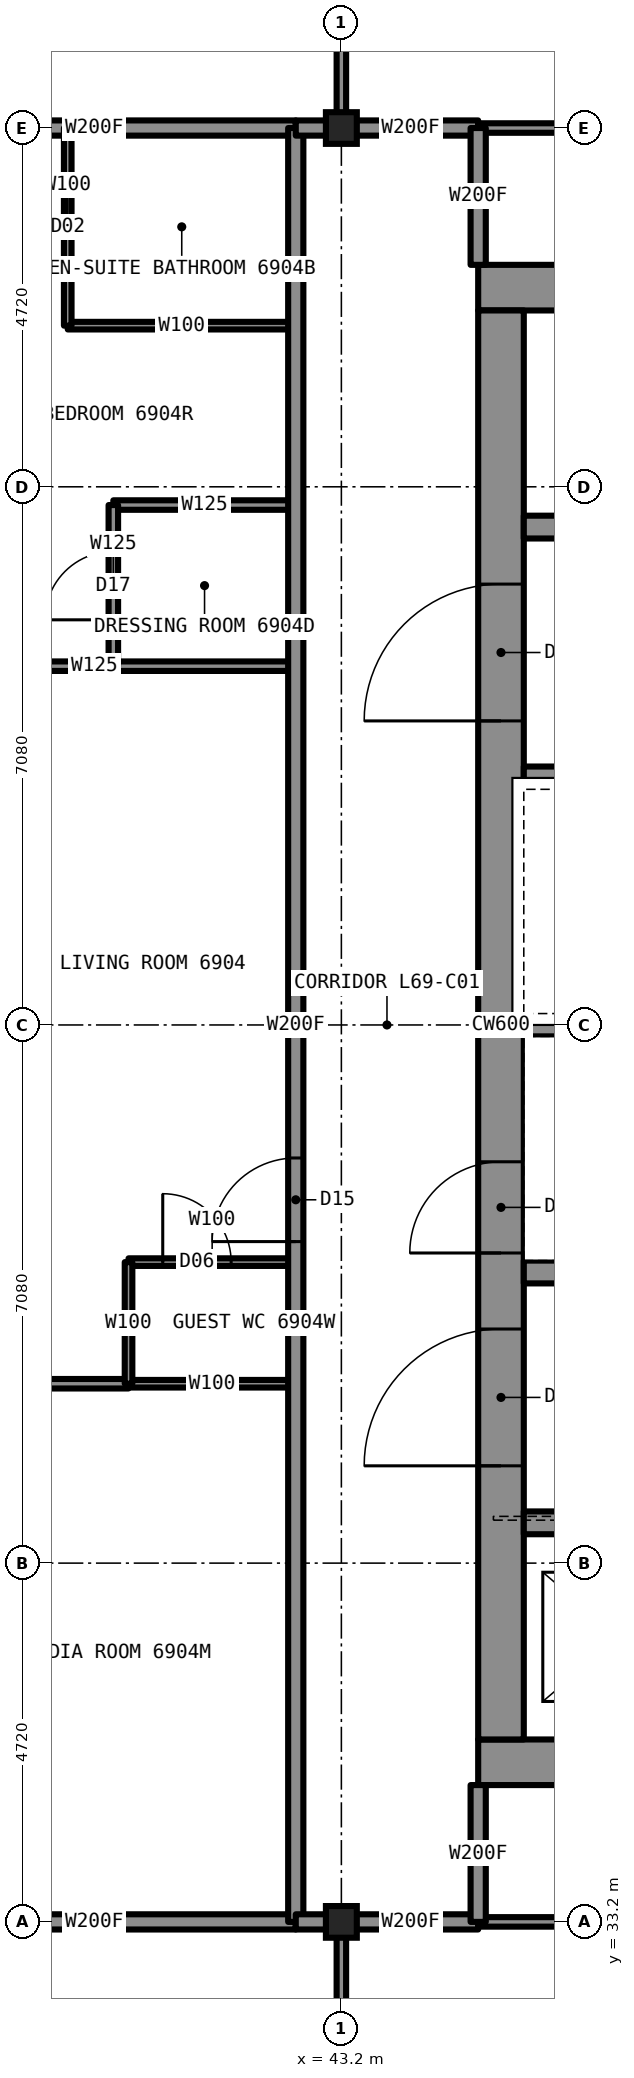
"""IFC4 building model, lengths in metres.
Left out: names, types, materials, properties, quantities, classifications, styles, units other than length and angle.
Written with IfcOpenShell. Run it as: python <this file> out.ifc"""

import sys

from ifc_helpers import new_model, si_unit, direction, frame, frame_2d, origin, origin_2d, place, context, subcontext, project, spatial, rectangle, i_section, extrude, element, fill, save


model = new_model("IFC4")
c1 = context("Model", 3, precision=1e-05, world=origin(), true_north=direction((0.0, 1.0)))
c2 = subcontext(c1, "Body", "Model", "MODEL_VIEW")
j1 = project(units=[si_unit("LENGTHUNIT", "METRE"), si_unit("PLANEANGLEUNIT", "RADIAN")], contexts=[c1])
p1 = place(None, origin())
s1 = spatial("IfcSite", under=j1, at=p1, CompositionType="ELEMENT")
p2 = place(p1, origin())
s2 = spatial("IfcBuilding", under=s1, at=p2, CompositionType="ELEMENT")
p3 = place(p2, frame((0.0, 0.0, 254.7)))
s3 = spatial("IfcBuildingStorey", under=s2, at=p3, CompositionType="ELEMENT", Elevation=254.7)
for number, where, z_axis, x_axis in (
    (1, (43.2, 33.2, 0.0), (0.0, 0.0, 1.0), (1.0, 0.0, 0.0)),
    (2, (43.2, 56.8, 0.0), (0.0, 0.0, 1.0), (1.0, 0.0, 0.0)),
):
    element("IfcColumn", number, at=place(p3, frame(where, z_axis=z_axis, x_axis=x_axis)), inside=s3, PredefinedType="COLUMN", context=c2, shape_type="SweptSolid", body=[
        extrude(i_section(OverallWidth=0.406, OverallDepth=0.417, WebThickness=0.03, FlangeThickness=0.048, at=origin_2d()), origin(), (0.0, 0.0, 1.0), 3.5),
    ])
for number, where, z_axis, x_axis in (
    (3, (45.0, 54.7, 0.0), (0.0, 0.0, 1.0), (1.0, 0.0, 0.0)),
    (4, (45.0, 35.3, 0.0), (0.0, 0.0, 1.0), (1.0, 0.0, 0.0)),
):
    element("IfcWall", number, at=place(p3, frame(where, z_axis=z_axis, x_axis=x_axis)), inside=s3, PredefinedType="SHEAR", context=c2, shape_type="SweptSolid", body=[
        extrude(rectangle(XDim=20.0, YDim=0.6, at=frame_2d((10.0, 0.0))), origin(), (0.0, 0.0, 1.0), 3.5),
    ])
p4 = place(p3, frame((45.3, 35.6, 0.0), z_axis=(0.0, 0.0, 1.0), x_axis=(0.0, 1.0, 0.0)))
e5 = element("IfcWall", 5, at=p4, inside=s3, PredefinedType="SHEAR", context=c2, shape_type="SweptSolid", body=[
    extrude(rectangle(XDim=18.8, YDim=0.6, at=frame_2d((9.4, 0.0))), origin(), (0.0, 0.0, 1.0), 3.5),
])
p5 = place(p4, frame((13.4, 0.0, 0.0)))
e6 = element("IfcOpeningElement", 6, at=p5, cuts=e5, PredefinedType="OPENING", context=c2, shape_type="SweptSolid", body=[
    extrude(rectangle(XDim=1.8, YDim=2.2, at=frame_2d((0.9, 1.1))), frame((0.0, 0.31, 0.0), z_axis=(0.0, -1.0, 0.0), x_axis=(1.0, 0.0, 0.0)), (0.0, 0.0, 1.0), 0.62),
])
p6 = place(p4, frame((3.6, 0.0, 0.0)))
e7 = element("IfcOpeningElement", 7, at=p6, cuts=e5, PredefinedType="OPENING", context=c2, shape_type="SweptSolid", body=[
    extrude(rectangle(XDim=1.8, YDim=2.2, at=frame_2d((0.9, 1.1))), frame((0.0, 0.31, 0.0), z_axis=(0.0, -1.0, 0.0), x_axis=(1.0, 0.0, 0.0)), (0.0, 0.0, 1.0), 0.62),
])
p7 = place(p4, frame((6.4, 0.0, 0.0)))
e8 = element("IfcOpeningElement", 8, at=p7, cuts=e5, PredefinedType="OPENING", context=c2, shape_type="SweptSolid", body=[
    extrude(rectangle(XDim=1.2, YDim=2.2, at=frame_2d((0.6, 1.1))), frame((0.0, 0.31, 0.0), z_axis=(0.0, -1.0, 0.0), x_axis=(1.0, 0.0, 0.0)), (0.0, 0.0, 1.0), 0.62),
])
p8 = place(p3, frame((45.6, 51.55, 0.0), z_axis=(0.0, 0.0, 1.0), x_axis=(1.0, 0.0, 0.0)))
e9 = element("IfcWall", 9, at=p8, inside=s3, PredefinedType="SHEAR", context=c2, shape_type="SweptSolid", body=[
    extrude(rectangle(XDim=18.8, YDim=0.3, at=frame_2d((9.4, 0.0))), origin(), (0.0, 0.0, 1.0), 3.5),
])
p9 = place(p8, frame((4.8, 0.0, 0.0)))
e10 = element("IfcOpeningElement", 10, at=p9, cuts=e9, PredefinedType="OPENING", context=c2, shape_type="SweptSolid", body=[
    extrude(rectangle(XDim=1.0, YDim=2.1, at=frame_2d((0.5, 1.05))), frame((0.0, 0.16, 0.0), z_axis=(0.0, -1.0, 0.0), x_axis=(1.0, 0.0, 0.0)), (0.0, 0.0, 1.0), 0.32),
])
p10 = place(p8, frame((11.6, 0.0, 0.0)))
e11 = element("IfcOpeningElement", 11, at=p10, cuts=e9, PredefinedType="OPENING", context=c2, shape_type="SweptSolid", body=[
    extrude(rectangle(XDim=1.1, YDim=2.2, at=frame_2d((0.55, 1.1))), frame((0.0, 0.16, 0.0), z_axis=(0.0, -1.0, 0.0), x_axis=(1.0, 0.0, 0.0)), (0.0, 0.0, 1.0), 0.32),
])
p11 = place(p8, frame((14.3, 0.0, 0.0)))
e12 = element("IfcOpeningElement", 12, at=p11, cuts=e9, PredefinedType="OPENING", context=c2, shape_type="SweptSolid", body=[
    extrude(rectangle(XDim=1.1, YDim=2.2, at=frame_2d((0.55, 1.1))), frame((0.0, 0.16, 0.0), z_axis=(0.0, -1.0, 0.0), x_axis=(1.0, 0.0, 0.0)), (0.0, 0.0, 1.0), 0.32),
])
p12 = place(p3, frame((45.6, 38.45, 0.0), z_axis=(0.0, 0.0, 1.0), x_axis=(1.0, 0.0, 0.0)))
e13 = element("IfcWall", 13, at=p12, inside=s3, PredefinedType="SHEAR", context=c2, shape_type="SweptSolid", body=[
    extrude(rectangle(XDim=18.8, YDim=0.3, at=frame_2d((9.4, 0.0))), origin(), (0.0, 0.0, 1.0), 3.5),
])
p13 = place(p12, frame((0.7, 0.0, 0.0)))
e14 = element("IfcOpeningElement", 14, at=p13, cuts=e13, PredefinedType="OPENING", context=c2, shape_type="SweptSolid", body=[
    extrude(rectangle(XDim=1.1, YDim=2.2, at=frame_2d((0.55, 1.1))), frame((0.0, 0.16, 0.0), z_axis=(0.0, -1.0, 0.0), x_axis=(1.0, 0.0, 0.0)), (0.0, 0.0, 1.0), 0.32),
])
p14 = place(p12, frame((3.4, 0.0, 0.0)))
e15 = element("IfcOpeningElement", 15, at=p14, cuts=e13, PredefinedType="OPENING", context=c2, shape_type="SweptSolid", body=[
    extrude(rectangle(XDim=1.1, YDim=2.2, at=frame_2d((0.55, 1.1))), frame((0.0, 0.16, 0.0), z_axis=(0.0, -1.0, 0.0), x_axis=(1.0, 0.0, 0.0)), (0.0, 0.0, 1.0), 0.32),
])
p15 = place(p12, frame((6.1, 0.0, 0.0)))
e16 = element("IfcOpeningElement", 16, at=p15, cuts=e13, PredefinedType="OPENING", context=c2, shape_type="SweptSolid", body=[
    extrude(rectangle(XDim=1.1, YDim=2.2, at=frame_2d((0.55, 1.1))), frame((0.0, 0.16, 0.0), z_axis=(0.0, -1.0, 0.0), x_axis=(1.0, 0.0, 0.0)), (0.0, 0.0, 1.0), 0.32),
])
p16 = place(p12, frame((8.8, 0.0, 0.0)))
e17 = element("IfcOpeningElement", 17, at=p16, cuts=e13, PredefinedType="OPENING", context=c2, shape_type="SweptSolid", body=[
    extrude(rectangle(XDim=1.1, YDim=2.2, at=frame_2d((0.55, 1.1))), frame((0.0, 0.16, 0.0), z_axis=(0.0, -1.0, 0.0), x_axis=(1.0, 0.0, 0.0)), (0.0, 0.0, 1.0), 0.32),
])
for number, where, z_axis, x_axis in (
    (18, (45.6, 48.25, 0.0), (0.0, 0.0, 1.0), (1.0, 0.0, 0.0)),
    (19, (45.6, 41.75, 0.0), (0.0, 0.0, 1.0), (1.0, 0.0, 0.0)),
):
    element("IfcWall", number, at=place(p3, frame(where, z_axis=z_axis, x_axis=x_axis)), inside=s3, PredefinedType="SHEAR", context=c2, shape_type="SweptSolid", body=[
        extrude(rectangle(XDim=7.1, YDim=0.3, at=frame_2d((3.55, 0.0))), origin(), (0.0, 0.0, 1.0), 3.5),
    ])
p17 = place(p3, frame((45.6, 45.0, 0.0), z_axis=(0.0, 0.0, 1.0), x_axis=(1.0, 0.0, 0.0)))
e20 = element("IfcWall", 20, at=p17, inside=s3, PredefinedType="SHEAR", context=c2, shape_type="SweptSolid", body=[
    extrude(rectangle(XDim=6.8, YDim=0.3, at=frame_2d((3.4, 0.0))), origin(), (0.0, 0.0, 1.0), 3.5),
])
p18 = place(p3, frame((43.22, 33.2, 0.0), z_axis=(0.0, 0.0, 1.0), x_axis=(1.0, 0.0, 0.0)))
e21 = element("IfcWall", 21, at=p18, inside=s3, PredefinedType="PARTITIONING", context=c2, shape_type="SweptSolid", body=[
    extrude(rectangle(XDim=1.78, YDim=0.2, at=frame_2d((0.89, 0.0))), origin(), (0.0, 0.0, 1.0), 3.33),
])
p19 = place(p3, frame((37.3, 33.2, 0.0), z_axis=(0.0, 0.0, 1.0), x_axis=(1.0, 0.0, 0.0)))
e22 = element("IfcWall", 22, at=p19, inside=s3, PredefinedType="PARTITIONING", context=c2, shape_type="SweptSolid", body=[
    extrude(rectangle(XDim=5.3, YDim=0.2, at=frame_2d((2.65, 0.0))), origin(), (0.0, 0.0, 1.0), 2.573),
])
p20 = place(p3, frame((45.0, 33.2, 0.0), z_axis=(0.0, 0.0, 1.0), x_axis=(1.0, 0.0, 0.0)))
e23 = element("IfcWall", 23, at=p20, inside=s3, PredefinedType="PARTITIONING", context=c2, shape_type="SweptSolid", body=[
    extrude(rectangle(XDim=2.92, YDim=0.125, at=frame_2d((1.46, 0.0))), origin(), (0.0, 0.0, 1.0), 3.33),
])
p21 = place(p3, frame((40.4, 41.88, 0.0), z_axis=(0.0, 0.0, 1.0), x_axis=(1.0, 0.0, 0.0)))
e24 = element("IfcWall", 24, at=p21, inside=s3, PredefinedType="PARTITIONING", context=c2, shape_type="SweptSolid", body=[
    extrude(rectangle(XDim=2.2, YDim=0.1, at=frame_2d((1.1, 0.0))), origin(), (0.0, 0.0, 1.0), 3.33),
])
p22 = place(p21, frame((0.45, 0.0, 0.0)))
e25 = element("IfcOpeningElement", 25, at=p22, cuts=e24, PredefinedType="OPENING", context=c2, shape_type="SweptSolid", body=[
    extrude(rectangle(XDim=0.9, YDim=2.1, at=frame_2d((0.45, 1.05))), frame((0.0, 0.06, 0.0), z_axis=(0.0, -1.0, 0.0), x_axis=(1.0, 0.0, 0.0)), (0.0, 0.0, 1.0), 0.12),
])
p23 = place(p3, frame((40.4, 40.28, 0.0), z_axis=(0.0, 0.0, 1.0), x_axis=(1.0, 0.0, 0.0)))
e26 = element("IfcWall", 26, at=p23, inside=s3, PredefinedType="PARTITIONING", context=c2, shape_type="SweptSolid", body=[
    extrude(rectangle(XDim=2.2, YDim=0.1, at=frame_2d((1.1, 0.0))), origin(), (0.0, 0.0, 1.0), 2.797),
])
p24 = place(p3, frame((37.3, 40.28, 0.0), z_axis=(0.0, 0.0, 1.0), x_axis=(1.0, 0.0, 0.0)))
e27 = element("IfcWall", 27, at=p24, inside=s3, PredefinedType="PARTITIONING", context=c2, shape_type="SweptSolid", body=[
    extrude(rectangle(XDim=3.1, YDim=0.125, at=frame_2d((1.55, 0.0))), origin(), (0.0, 0.0, 1.0), 2.797),
])
p25 = place(p24, frame((0.85, 0.0, 0.0)))
e28 = element("IfcOpeningElement", 28, at=p25, cuts=e27, PredefinedType="OPENING", context=c2, shape_type="SweptSolid", body=[
    extrude(rectangle(XDim=0.9, YDim=2.2, at=frame_2d((0.45, 1.1))), frame((0.0, 0.073, 0.0), z_axis=(0.0, -1.0, 0.0), x_axis=(1.0, 0.0, 0.0)), (0.0, 0.0, 1.0), 0.145),
])
p26 = place(p3, frame((43.22, 56.8, 0.0), z_axis=(0.0, 0.0, 1.0), x_axis=(1.0, 0.0, 0.0)))
e29 = element("IfcWall", 29, at=p26, inside=s3, PredefinedType="PARTITIONING", context=c2, shape_type="SweptSolid", body=[
    extrude(rectangle(XDim=1.78, YDim=0.2, at=frame_2d((0.89, 0.0))), origin(), (0.0, 0.0, 1.0), 3.33),
])
p27 = place(p3, frame((37.3, 56.8, 0.0), z_axis=(0.0, 0.0, 1.0), x_axis=(1.0, 0.0, 0.0)))
e30 = element("IfcWall", 30, at=p27, inside=s3, PredefinedType="PARTITIONING", context=c2, shape_type="SweptSolid", body=[
    extrude(rectangle(XDim=5.3, YDim=0.2, at=frame_2d((2.65, 0.0))), origin(), (0.0, 0.0, 1.0), 2.573),
])
p28 = place(p3, frame((45.0, 56.8, 0.0), z_axis=(0.0, 0.0, 1.0), x_axis=(1.0, 0.0, 0.0)))
e31 = element("IfcWall", 31, at=p28, inside=s3, PredefinedType="PARTITIONING", context=c2, shape_type="SweptSolid", body=[
    extrude(rectangle(XDim=2.92, YDim=0.125, at=frame_2d((1.46, 0.0))), origin(), (0.0, 0.0, 1.0), 3.33),
])
p29 = place(p3, frame((37.3, 49.72, 0.0), z_axis=(0.0, 0.0, 1.0), x_axis=(1.0, 0.0, 0.0)))
e32 = element("IfcWall", 32, at=p29, inside=s3, PredefinedType="PARTITIONING", context=c2, shape_type="SweptSolid", body=[
    extrude(rectangle(XDim=5.3, YDim=0.125, at=frame_2d((2.65, 0.0))), origin(), (0.0, 0.0, 1.0), 2.797),
])
p30 = place(p29, frame((0.85, 0.0, 0.0)))
e33 = element("IfcOpeningElement", 33, at=p30, cuts=e32, PredefinedType="OPENING", context=c2, shape_type="SweptSolid", body=[
    extrude(rectangle(XDim=0.9, YDim=2.2, at=frame_2d((0.45, 1.1))), frame((0.0, 0.073, 0.0), z_axis=(0.0, -1.0, 0.0), x_axis=(1.0, 0.0, 0.0)), (0.0, 0.0, 1.0), 0.145),
])
p31 = place(p3, frame((40.2, 51.84, 0.0), z_axis=(0.0, 0.0, 1.0), x_axis=(1.0, 0.0, 0.0)))
e34 = element("IfcWall", 34, at=p31, inside=s3, PredefinedType="PARTITIONING", context=c2, shape_type="SweptSolid", body=[
    extrude(rectangle(XDim=2.4, YDim=0.125, at=frame_2d((1.2, 0.0))), origin(), (0.0, 0.0, 1.0), 3.33),
])
p32 = place(p3, frame((39.6, 54.2, 0.0), z_axis=(0.0, 0.0, 1.0), x_axis=(1.0, 0.0, 0.0)))
e35 = element("IfcWall", 35, at=p32, inside=s3, PredefinedType="PARTITIONING", context=c2, shape_type="SweptSolid", body=[
    extrude(rectangle(XDim=3.0, YDim=0.1, at=frame_2d((1.5, 0.0))), origin(), (0.0, 0.0, 1.0), 3.33),
])
for number, where, z_axis, x_axis in (
    (36, (45.0, 33.2, 0.0), (0.0, 0.0, 1.0), (0.0, 1.0, 0.0)),
    (37, (45.0, 55.0, 0.0), (0.0, 0.0, 1.0), (0.0, 1.0, 0.0)),
):
    element("IfcWall", number, at=place(p3, frame(where, z_axis=z_axis, x_axis=x_axis)), inside=s3, PredefinedType="PARTITIONING", context=c2, shape_type="SweptSolid", body=[
        extrude(rectangle(XDim=1.8, YDim=0.2, at=frame_2d((0.9, 0.0))), origin(), (0.0, 0.0, 1.0), 3.33),
    ])
p33 = place(p3, frame((43.2, 27.3, 0.0), z_axis=(0.0, 0.0, 1.0), x_axis=(0.0, 1.0, 0.0)))
e38 = element("IfcWall", 38, at=p33, inside=s3, PredefinedType="PARTITIONING", context=c2, shape_type="SweptSolid", body=[
    extrude(rectangle(XDim=5.9, YDim=0.125, at=frame_2d((2.95, 0.0))), origin(), (0.0, 0.0, 1.0), 2.573),
])
p34 = place(p33, frame((1.45, 0.0, 0.0)))
e39 = element("IfcOpeningElement", 39, at=p34, cuts=e38, PredefinedType="OPENING", context=c2, shape_type="SweptSolid", body=[
    extrude(rectangle(XDim=0.9, YDim=2.2, at=frame_2d((0.45, 1.1))), frame((0.0, 0.073, 0.0), z_axis=(0.0, -1.0, 0.0), x_axis=(1.0, 0.0, 0.0)), (0.0, 0.0, 1.0), 0.145),
])
p35 = place(p3, frame((43.2, 56.8, 0.0), z_axis=(0.0, 0.0, 1.0), x_axis=(0.0, 1.0, 0.0)))
e40 = element("IfcWall", 40, at=p35, inside=s3, PredefinedType="PARTITIONING", context=c2, shape_type="SweptSolid", body=[
    extrude(rectangle(XDim=5.9, YDim=0.125, at=frame_2d((2.95, 0.0))), origin(), (0.0, 0.0, 1.0), 2.573),
])
p36 = place(p35, frame((3.55, 0.0, 0.0)))
e41 = element("IfcOpeningElement", 41, at=p36, cuts=e40, PredefinedType="OPENING", context=c2, shape_type="SweptSolid", body=[
    extrude(rectangle(XDim=0.9, YDim=2.2, at=frame_2d((0.45, 1.1))), frame((0.0, 0.073, 0.0), z_axis=(0.0, -1.0, 0.0), x_axis=(1.0, 0.0, 0.0)), (0.0, 0.0, 1.0), 0.145),
])
p37 = place(p3, frame((42.6, 33.2, 0.0), z_axis=(0.0, 0.0, 1.0), x_axis=(0.0, 1.0, 0.0)))
e42 = element("IfcWall", 42, at=p37, inside=s3, PredefinedType="PARTITIONING", context=c2, shape_type="SweptSolid", body=[
    extrude(rectangle(XDim=23.6, YDim=0.2, at=frame_2d((11.8, 0.0))), origin(), (0.0, 0.0, 1.0), 3.33),
])
p38 = place(p37, frame((8.95, 0.0, 0.0)))
e43 = element("IfcOpeningElement", 43, at=p38, cuts=e42, PredefinedType="OPENING", context=c2, shape_type="SweptSolid", body=[
    extrude(rectangle(XDim=1.1, YDim=2.2, at=frame_2d((0.55, 1.1))), frame((0.0, 0.11, 0.0), z_axis=(0.0, -1.0, 0.0), x_axis=(1.0, 0.0, 0.0)), (0.0, 0.0, 1.0), 0.22),
])
p39 = place(p3, frame((40.4, 40.28, 0.0), z_axis=(0.0, 0.0, 1.0), x_axis=(0.0, 1.0, 0.0)))
e44 = element("IfcWall", 44, at=p39, inside=s3, PredefinedType="PARTITIONING", context=c2, shape_type="SweptSolid", body=[
    extrude(rectangle(XDim=1.6, YDim=0.1, at=frame_2d((0.8, 0.0))), origin(), (0.0, 0.0, 1.0), 3.33),
])
p40 = place(p3, frame((40.2, 49.72, 0.0), z_axis=(0.0, 0.0, 1.0), x_axis=(0.0, 1.0, 0.0)))
e45 = element("IfcWall", 45, at=p40, inside=s3, PredefinedType="PARTITIONING", context=c2, shape_type="SweptSolid", body=[
    extrude(rectangle(XDim=2.12, YDim=0.125, at=frame_2d((1.06, 0.0))), origin(), (0.0, 0.0, 1.0), 3.33),
])
p41 = place(p40, frame((0.61, 0.0, 0.0)))
e46 = element("IfcOpeningElement", 46, at=p41, cuts=e45, PredefinedType="OPENING", context=c2, shape_type="SweptSolid", body=[
    extrude(rectangle(XDim=0.9, YDim=2.2, at=frame_2d((0.45, 1.1))), frame((0.0, 0.073, 0.0), z_axis=(0.0, -1.0, 0.0), x_axis=(1.0, 0.0, 0.0)), (0.0, 0.0, 1.0), 0.145),
])
p42 = place(p3, frame((39.6, 54.2, 0.0), z_axis=(0.0, 0.0, 1.0), x_axis=(0.0, 1.0, 0.0)))
e47 = element("IfcWall", 47, at=p42, inside=s3, PredefinedType="PARTITIONING", context=c2, shape_type="SweptSolid", body=[
    extrude(rectangle(XDim=2.6, YDim=0.1, at=frame_2d((1.3, 0.0))), origin(), (0.0, 0.0, 1.0), 3.33),
])
p43 = place(p42, frame((0.85, 0.0, 0.0)))
e48 = element("IfcOpeningElement", 48, at=p43, cuts=e47, PredefinedType="OPENING", context=c2, shape_type="SweptSolid", body=[
    extrude(rectangle(XDim=0.9, YDim=2.1, at=frame_2d((0.45, 1.05))), frame((0.0, 0.06, 0.0), z_axis=(0.0, -1.0, 0.0), x_axis=(1.0, 0.0, 0.0)), (0.0, 0.0, 1.0), 0.12),
])
for number, where, z_axis, x_axis in (
    (49, (42.6, 33.2, 0.0), (0.0, 0.0, 1.0), (1.0, 0.0, 0.0)),
    (50, (42.6, 56.8, 0.0), (0.0, 0.0, 1.0), (1.0, 0.0, 0.0)),
):
    element("IfcWall", number, at=place(p3, frame(where, z_axis=z_axis, x_axis=x_axis)), inside=s3, PredefinedType="PARTITIONING", context=c2, shape_type="SweptSolid", body=[
        extrude(rectangle(XDim=0.62, YDim=0.2, at=frame_2d((0.31, 0.0))), origin(), (0.0, 0.0, 1.0), 2.573),
    ])
p44 = place(p38, origin())
e51 = element("IfcDoor", 51, at=p44, inside=s3, OperationType="SINGLE_SWING_LEFT", PredefinedType="DOOR", context=c2, shape_type="SweptSolid", body=[
    extrude(rectangle(XDim=1.1, YDim=2.2, at=frame_2d((0.55, 1.1))), frame((0.0, 0.025, 0.0), z_axis=(0.0, -1.0, 0.0), x_axis=(1.0, 0.0, 0.0)), (0.0, 0.0, 1.0), 0.05),
])
fill(e43, e51)
p45 = place(p43, origin())
e52 = element("IfcDoor", 52, at=p45, inside=s3, OperationType="SINGLE_SWING_RIGHT", PredefinedType="DOOR", context=c2, shape_type="SweptSolid", body=[
    extrude(rectangle(XDim=0.9, YDim=2.1, at=frame_2d((0.45, 1.05))), frame((0.0, 0.025, 0.0), z_axis=(0.0, -1.0, 0.0), x_axis=(1.0, 0.0, 0.0)), (0.0, 0.0, 1.0), 0.05),
])
fill(e48, e52)
p46 = place(p41, origin())
e53 = element("IfcDoor", 53, at=p46, inside=s3, OperationType="SINGLE_SWING_LEFT", PredefinedType="DOOR", context=c2, shape_type="SweptSolid", body=[
    extrude(rectangle(XDim=0.9, YDim=2.2, at=frame_2d((0.45, 1.1))), frame((0.0, 0.025, 0.0), z_axis=(0.0, -1.0, 0.0), x_axis=(1.0, 0.0, 0.0)), (0.0, 0.0, 1.0), 0.05),
])
fill(e46, e53)
p47 = place(p22, origin())
e54 = element("IfcDoor", 54, at=p47, inside=s3, OperationType="SINGLE_SWING_LEFT", PredefinedType="DOOR", context=c2, shape_type="SweptSolid", body=[
    extrude(rectangle(XDim=0.9, YDim=2.1, at=frame_2d((0.45, 1.05))), frame((0.0, 0.025, 0.0), z_axis=(0.0, -1.0, 0.0), x_axis=(1.0, 0.0, 0.0)), (0.0, 0.0, 1.0), 0.05),
])
fill(e25, e54)
p48 = place(p5, origin())
e55 = element("IfcDoor", 55, at=p48, inside=s3, OperationType="DOUBLE_DOOR_SINGLE_SWING", PredefinedType="DOOR", context=c2, shape_type="SweptSolid", body=[
    extrude(rectangle(XDim=1.8, YDim=2.2, at=frame_2d((0.9, 1.1))), frame((0.0, 0.025, 0.0), z_axis=(0.0, -1.0, 0.0), x_axis=(1.0, 0.0, 0.0)), (0.0, 0.0, 1.0), 0.05),
])
fill(e6, e55)
p49 = place(p6, origin())
e56 = element("IfcDoor", 56, at=p49, inside=s3, OperationType="DOUBLE_DOOR_SINGLE_SWING", PredefinedType="DOOR", context=c2, shape_type="SweptSolid", body=[
    extrude(rectangle(XDim=1.8, YDim=2.2, at=frame_2d((0.9, 1.1))), frame((0.0, 0.025, 0.0), z_axis=(0.0, -1.0, 0.0), x_axis=(1.0, 0.0, 0.0)), (0.0, 0.0, 1.0), 0.05),
])
fill(e7, e56)
p50 = place(p7, origin())
e57 = element("IfcDoor", 57, at=p50, inside=s3, OperationType="SINGLE_SWING_LEFT", PredefinedType="DOOR", context=c2, shape_type="SweptSolid", body=[
    extrude(rectangle(XDim=1.2, YDim=2.2, at=frame_2d((0.6, 1.1))), frame((0.0, 0.025, 0.0), z_axis=(0.0, -1.0, 0.0), x_axis=(1.0, 0.0, 0.0)), (0.0, 0.0, 1.0), 0.05),
])
fill(e8, e57)
save(model, sys.argv[1])
